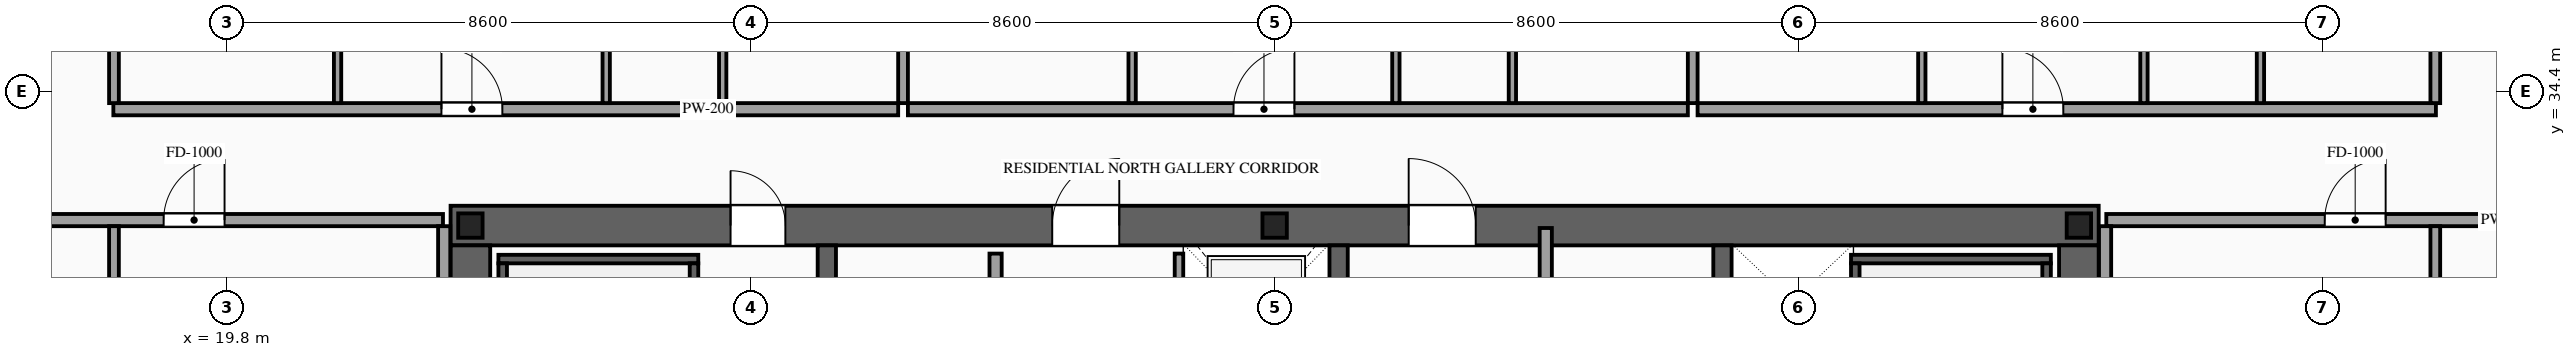
"""IFC4 building model, lengths in metres.
Left out: names, types, materials, properties, quantities, classifications, styles, units other than length and angle.
Written with IfcOpenShell. Run it as: python <this file> out.ifc"""

import sys

from ifc_helpers import new_model, si_unit, direction, frame, frame_2d, origin, origin_2d, place, context, subcontext, project, spatial, rectangle, i_section, extrude, source, transform, mapped, element, fill, save


model = new_model("IFC4")
c1 = context("Model", 3, precision=1e-05, world=origin(), true_north=direction((0.0, 1.0)))
c2 = subcontext(c1, "Body", "Model", "MODEL_VIEW")
j1 = project(units=[si_unit("LENGTHUNIT", "METRE"), si_unit("PLANEANGLEUNIT", "RADIAN")], contexts=[c1])
p1 = place(None, origin())
s1 = spatial("IfcSite", under=j1, at=p1, CompositionType="ELEMENT")
p2 = place(p1, origin())
s2 = spatial("IfcBuilding", under=s1, at=p2, CompositionType="ELEMENT")
p3 = place(p2, frame((0.0, 0.0, 202.0)))
s3 = spatial("IfcBuildingStorey", under=s2, at=p3, CompositionType="ELEMENT", Elevation=202.0)
p4 = place(p3, frame((23.475, 32.2, 0.0), z_axis=(0.0, 0.0, 1.0), x_axis=(1.0, 0.0, 0.0)))
e1 = element("IfcWall", 1, at=p4, inside=s3, PredefinedType="SHEAR", context=c2, shape_type="SweptSolid", body=[
    extrude(rectangle(XDim=27.05, YDim=0.65, at=frame_2d((13.525, 0.0))), origin(), (0.0, 0.0, 1.0), 3.5),
])
p5 = place(p4, frame((4.595, 0.0, 0.0)))
e2 = element("IfcOpeningElement", 2, at=p5, cuts=e1, PredefinedType="OPENING", context=c2, shape_type="SweptSolid", body=[
    extrude(rectangle(XDim=0.9, YDim=2.15, at=frame_2d((0.45, 1.075))), frame((0.0, 0.34, 0.0), z_axis=(0.0, -1.0, 0.0), x_axis=(1.0, 0.0, 0.0)), (0.0, 0.0, 1.0), 0.68),
])
p6 = place(p4, frame((9.875, 0.0, 0.0)))
e3 = element("IfcOpeningElement", 3, at=p6, cuts=e1, PredefinedType="OPENING", context=c2, shape_type="SweptSolid", body=[
    extrude(rectangle(XDim=1.1, YDim=2.2, at=frame_2d((0.55, 1.1))), frame((0.0, 0.34, 0.0), z_axis=(0.0, -1.0, 0.0), x_axis=(1.0, 0.0, 0.0)), (0.0, 0.0, 1.0), 0.68),
])
p7 = place(p4, frame((15.725, 0.0, 0.0)))
e4 = element("IfcOpeningElement", 4, at=p7, cuts=e1, PredefinedType="OPENING", context=c2, shape_type="SweptSolid", body=[
    extrude(rectangle(XDim=1.1, YDim=2.2, at=frame_2d((0.55, 1.1))), frame((0.0, 0.34, 0.0), z_axis=(0.0, -1.0, 0.0), x_axis=(1.0, 0.0, 0.0)), (0.0, 0.0, 1.0), 0.68),
])
m1 = source(origin(), c2, "Body", "SweptSolid", [
    extrude(rectangle(XDim=12.15, YDim=0.65, at=frame_2d((6.075, 0.0))), origin(), (0.0, 0.0, 1.0), 3.5),
])
for number, where, z_axis, x_axis in (
    (5, (23.8, 19.725, 0.0), (0.0, 0.0, 1.0), (0.0, 1.0, 0.0)),
    (6, (50.2, 19.725, 0.0), (0.0, 0.0, 1.0), (0.0, 1.0, 0.0)),
):
    element("IfcWall", number, at=place(p3, frame(where, z_axis=z_axis, x_axis=x_axis)), inside=s3, PredefinedType="SHEAR", context=c2, shape_type="MappedRepresentation", body=[
        mapped(m1, transform((0.0, 0.0, 0.0), scale=1.0)),
    ])
m2 = source(origin(), c2, "Body", "SweptSolid", [
    extrude(rectangle(XDim=12.15, YDim=0.3, at=frame_2d((6.075, 0.0))), origin(), (0.0, 0.0, 1.0), 3.5),
])
for number, where, z_axis, x_axis in (
    (7, (29.65, 19.725, 0.0), (0.0, 0.0, 1.0), (0.0, 1.0, 0.0)),
    (8, (38.05, 19.725, 0.0), (0.0, 0.0, 1.0), (0.0, 1.0, 0.0)),
    (9, (44.35, 19.725, 0.0), (0.0, 0.0, 1.0), (0.0, 1.0, 0.0)),
):
    element("IfcWall", number, at=place(p3, frame(where, z_axis=z_axis, x_axis=x_axis)), inside=s3, PredefinedType="SOLIDWALL", context=c2, shape_type="MappedRepresentation", body=[
        mapped(m2, transform((0.0, 0.0, 0.0), scale=1.0)),
    ])
m3 = source(origin(), c2, "Body", "SweptSolid", [
    extrude(i_section(OverallWidth=0.4, OverallDepth=0.4, WebThickness=0.013, FlangeThickness=0.021, at=origin_2d()), origin(), (0.0, 0.0, 1.0), 3.5),
])
for number, where, z_axis, x_axis in (
    (10, (23.8, 32.2, 0.0), (0.0, 0.0, 1.0), (1.0, 0.0, 0.0)),
    (11, (37.0, 32.2, 0.0), (0.0, 0.0, 1.0), (1.0, 0.0, 0.0)),
    (12, (50.2, 32.2, 0.0), (0.0, 0.0, 1.0), (1.0, 0.0, 0.0)),
):
    element("IfcColumn", number, at=place(p3, frame(where, z_axis=z_axis, x_axis=x_axis)), inside=s3, PredefinedType="COLUMN", context=c2, shape_type="MappedRepresentation", body=[
        mapped(m3, transform((0.0, 0.0, 0.0), scale=1.0)),
    ])
p8 = place(p3, frame((35.43, 29.4, 0.0), z_axis=(0.0, 0.0, 1.0), x_axis=(0.0, 1.0, 0.0)))
e13 = element("IfcWall", 13, at=p8, inside=s3, PredefinedType="SOLIDWALL", context=c2, shape_type="SweptSolid", body=[
    extrude(rectangle(XDim=2.34, YDim=0.14, at=frame_2d((1.17, 0.0))), origin(), (0.0, 0.0, 1.0), 3.28),
])
p9 = place(p8, frame((0.62, 0.0, 0.0)))
e14 = element("IfcOpeningElement", 14, at=p9, cuts=e13, PredefinedType="OPENING", context=c2, shape_type="SweptSolid", body=[
    extrude(rectangle(XDim=1.1, YDim=2.2, at=frame_2d((0.55, 1.1))), frame((0.0, 0.085, 0.0), z_axis=(0.0, -1.0, 0.0), x_axis=(1.0, 0.0, 0.0)), (0.0, 0.0, 1.0), 0.17),
])
m4 = source(origin(), c2, "Body", "SweptSolid", [
    extrude(rectangle(XDim=3.28, YDim=0.14, at=frame_2d((1.64, 0.0))), origin(), (0.0, 0.0, 1.0), 3.28),
])
p10 = place(p3, frame((24.26, 31.65, 0.0), z_axis=(0.0, 0.0, 1.0), x_axis=(1.0, 0.0, 0.0)))
e15 = element("IfcWall", 15, at=p10, inside=s3, PredefinedType="SOLIDWALL", context=c2, shape_type="MappedRepresentation", body=[
    mapped(m4, transform((0.0, 0.0, 0.0), scale=1.0)),
])
m5 = source(origin(), c2, "Body", "SweptSolid", [
    extrude(rectangle(XDim=8.94, YDim=0.14, at=frame_2d((4.47, 0.0))), origin(), (0.0, 0.0, 1.0), 3.28),
])
for number, where, z_axis, x_axis in (
    (16, (24.33, 22.64, 0.0), (0.0, 0.0, 1.0), (0.0, 1.0, 0.0)),
    (17, (27.47, 22.64, 0.0), (0.0, 0.0, 1.0), (0.0, 1.0, 0.0)),
):
    element("IfcWall", number, at=place(p3, frame(where, z_axis=z_axis, x_axis=x_axis)), inside=s3, PredefinedType="SOLIDWALL", context=c2, shape_type="MappedRepresentation", body=[
        mapped(m5, transform((0.0, 0.0, 0.0), scale=1.0)),
    ])
p11 = place(p3, frame((46.46, 31.65, 0.0), z_axis=(0.0, 0.0, 1.0), x_axis=(1.0, 0.0, 0.0)))
e18 = element("IfcWall", 18, at=p11, inside=s3, PredefinedType="SOLIDWALL", context=c2, shape_type="MappedRepresentation", body=[
    mapped(m4, transform((0.0, 0.0, 0.0), scale=1.0)),
])
for number, where, z_axis, x_axis in (
    (19, (46.53, 22.64, 0.0), (0.0, 0.0, 1.0), (0.0, 1.0, 0.0)),
    (20, (49.67, 22.64, 0.0), (0.0, 0.0, 1.0), (0.0, 1.0, 0.0)),
):
    element("IfcWall", number, at=place(p3, frame(where, z_axis=z_axis, x_axis=x_axis)), inside=s3, PredefinedType="SOLIDWALL", context=c2, shape_type="MappedRepresentation", body=[
        mapped(m5, transform((0.0, 0.0, 0.0), scale=1.0)),
    ])
p12 = place(p3, frame((32.42, 19.86, 0.0), z_axis=(0.0, 0.0, 1.0), x_axis=(0.0, 1.0, 0.0)))
e21 = element("IfcWall", 21, at=p12, inside=s3, PredefinedType="PARTITIONING", context=c2, shape_type="SweptSolid", body=[
    extrude(rectangle(XDim=11.88, YDim=0.2, at=frame_2d((5.94, 0.0))), origin(), (0.0, 0.0, 1.0), 3.28),
])
p13 = place(p12, frame((5.49, 0.0, 0.0)))
e22 = element("IfcOpeningElement", 22, at=p13, cuts=e21, PredefinedType="OPENING", context=c2, shape_type="SweptSolid", body=[
    extrude(rectangle(XDim=0.9, YDim=2.15, at=frame_2d((0.45, 1.075))), frame((0.0, 0.115, 0.0), z_axis=(0.0, -1.0, 0.0), x_axis=(1.0, 0.0, 0.0)), (0.0, 0.0, 1.0), 0.23),
])
m6 = source(origin(), c2, "Body", "SweptSolid", [
    extrude(rectangle(XDim=12.72, YDim=0.2, at=frame_2d((6.36, 0.0))), origin(), (0.0, 0.0, 1.0), 3.28),
])
p14 = place(p3, frame((41.45, 19.44, 0.0), z_axis=(0.0, 0.0, 1.0), x_axis=(0.0, 1.0, 0.0)))
e23 = element("IfcWall", 23, at=p14, inside=s3, PredefinedType="PARTITIONING", context=c2, shape_type="MappedRepresentation", body=[
    mapped(m6, transform((0.0, 0.0, 0.0), scale=1.0)),
])
p15 = place(p3, frame((17.94, 34.11, 0.0), z_axis=(0.0, 0.0, 1.0), x_axis=(1.0, 0.0, 0.0)))
e24 = element("IfcWall", 24, at=p15, inside=s3, PredefinedType="PARTITIONING", context=c2, shape_type="SweptSolid", body=[
    extrude(rectangle(XDim=12.881, YDim=0.2, at=frame_2d((6.44, 0.0))), origin(), (0.0, 0.0, 1.0), 3.28),
])
p16 = place(p15, frame((5.385, 0.0, 0.0)))
e25 = element("IfcOpeningElement", 25, at=p16, cuts=e24, PredefinedType="OPENING", context=c2, shape_type="SweptSolid", body=[
    extrude(rectangle(XDim=1.0, YDim=2.2, at=frame_2d((0.5, 1.1))), frame((0.0, 0.115, 0.0), z_axis=(0.0, -1.0, 0.0), x_axis=(1.0, 0.0, 0.0)), (0.0, 0.0, 1.0), 0.23),
])
m7 = source(origin(), c2, "Body", "SweptSolid", [
    extrude(rectangle(XDim=13.54, YDim=0.16, at=frame_2d((6.77, 0.0))), origin(), (0.0, 0.0, 1.0), 3.28),
])
p17 = place(p3, frame((30.901, 34.21, 0.0), z_axis=(0.0, 0.0, 1.0), x_axis=(0.0, 1.0, 0.0)))
e26 = element("IfcWall", 26, at=p17, inside=s3, PredefinedType="PARTITIONING", context=c2, shape_type="MappedRepresentation", body=[
    mapped(m7, transform((0.0, 0.0, 0.0), scale=1.0)),
])
m8 = source(origin(), c2, "Body", "SweptSolid", [
    extrude(rectangle(XDim=5.61, YDim=0.12, at=frame_2d((2.805, 0.0))), origin(), (0.0, 0.0, 1.0), 3.28),
])
p18 = place(p3, frame((21.62, 34.21, 0.0), z_axis=(0.0, 0.0, 1.0), x_axis=(0.0, 1.0, 0.0)))
e27 = element("IfcWall", 27, at=p18, inside=s3, PredefinedType="PARTITIONING", context=c2, shape_type="MappedRepresentation", body=[
    mapped(m8, transform((0.0, 0.0, 0.0), scale=1.0)),
])
p19 = place(p3, frame((27.941, 34.21, 0.0), z_axis=(0.0, 0.0, 1.0), x_axis=(0.0, 1.0, 0.0)))
e28 = element("IfcWall", 28, at=p19, inside=s3, PredefinedType="PARTITIONING", context=c2, shape_type="SweptSolid", body=[
    extrude(rectangle(XDim=5.61, YDim=0.12, at=frame_2d((2.805, 0.0))), origin(), (0.0, 0.0, 1.0), 3.28),
])
p20 = place(p19, frame((2.38, 0.0, 0.0)))
e29 = element("IfcOpeningElement", 29, at=p20, cuts=e28, PredefinedType="OPENING", context=c2, shape_type="SweptSolid", body=[
    extrude(rectangle(XDim=0.85, YDim=2.1, at=frame_2d((0.425, 1.05))), frame((0.0, 0.075, 0.0), z_axis=(0.0, -1.0, 0.0), x_axis=(1.0, 0.0, 0.0)), (0.0, 0.0, 1.0), 0.15),
])
p21 = place(p3, frame((26.029, 34.21, 0.0), z_axis=(0.0, 0.0, 1.0), x_axis=(0.0, 1.0, 0.0)))
e30 = element("IfcWall", 30, at=p21, inside=s3, PredefinedType="PARTITIONING", context=c2, shape_type="SweptSolid", body=[
    extrude(rectangle(XDim=5.61, YDim=0.12, at=frame_2d((2.805, 0.0))), origin(), (0.0, 0.0, 1.0), 3.28),
])
p22 = place(p21, frame((2.38, 0.0, 0.0)))
e31 = element("IfcOpeningElement", 31, at=p22, cuts=e30, PredefinedType="OPENING", context=c2, shape_type="SweptSolid", body=[
    extrude(rectangle(XDim=0.85, YDim=2.1, at=frame_2d((0.425, 1.05))), frame((0.0, 0.075, 0.0), z_axis=(0.0, -1.0, 0.0), x_axis=(1.0, 0.0, 0.0)), (0.0, 0.0, 1.0), 0.15),
])
p23 = place(p3, frame((30.981, 34.11, 0.0), z_axis=(0.0, 0.0, 1.0), x_axis=(1.0, 0.0, 0.0)))
e32 = element("IfcWall", 32, at=p23, inside=s3, PredefinedType="PARTITIONING", context=c2, shape_type="SweptSolid", body=[
    extrude(rectangle(XDim=12.801, YDim=0.2, at=frame_2d((6.4, 0.0))), origin(), (0.0, 0.0, 1.0), 3.28),
])
p24 = place(p23, frame((5.344, 0.0, 0.0)))
e33 = element("IfcOpeningElement", 33, at=p24, cuts=e32, PredefinedType="OPENING", context=c2, shape_type="SweptSolid", body=[
    extrude(rectangle(XDim=1.0, YDim=2.2, at=frame_2d((0.5, 1.1))), frame((0.0, 0.115, 0.0), z_axis=(0.0, -1.0, 0.0), x_axis=(1.0, 0.0, 0.0)), (0.0, 0.0, 1.0), 0.23),
])
p25 = place(p3, frame((43.862, 34.21, 0.0), z_axis=(0.0, 0.0, 1.0), x_axis=(0.0, 1.0, 0.0)))
e34 = element("IfcWall", 34, at=p25, inside=s3, PredefinedType="PARTITIONING", context=c2, shape_type="MappedRepresentation", body=[
    mapped(m7, transform((0.0, 0.0, 0.0), scale=1.0)),
])
p26 = place(p3, frame((34.661, 34.21, 0.0), z_axis=(0.0, 0.0, 1.0), x_axis=(0.0, 1.0, 0.0)))
e35 = element("IfcWall", 35, at=p26, inside=s3, PredefinedType="PARTITIONING", context=c2, shape_type="MappedRepresentation", body=[
    mapped(m8, transform((0.0, 0.0, 0.0), scale=1.0)),
])
p27 = place(p3, frame((40.902, 34.21, 0.0), z_axis=(0.0, 0.0, 1.0), x_axis=(0.0, 1.0, 0.0)))
e36 = element("IfcWall", 36, at=p27, inside=s3, PredefinedType="PARTITIONING", context=c2, shape_type="SweptSolid", body=[
    extrude(rectangle(XDim=5.61, YDim=0.12, at=frame_2d((2.805, 0.0))), origin(), (0.0, 0.0, 1.0), 3.28),
])
p28 = place(p27, frame((2.38, 0.0, 0.0)))
e37 = element("IfcOpeningElement", 37, at=p28, cuts=e36, PredefinedType="OPENING", context=c2, shape_type="SweptSolid", body=[
    extrude(rectangle(XDim=0.85, YDim=2.1, at=frame_2d((0.425, 1.05))), frame((0.0, 0.075, 0.0), z_axis=(0.0, -1.0, 0.0), x_axis=(1.0, 0.0, 0.0)), (0.0, 0.0, 1.0), 0.15),
])
p29 = place(p3, frame((38.99, 34.21, 0.0), z_axis=(0.0, 0.0, 1.0), x_axis=(0.0, 1.0, 0.0)))
e38 = element("IfcWall", 38, at=p29, inside=s3, PredefinedType="PARTITIONING", context=c2, shape_type="SweptSolid", body=[
    extrude(rectangle(XDim=5.61, YDim=0.12, at=frame_2d((2.805, 0.0))), origin(), (0.0, 0.0, 1.0), 3.28),
])
p30 = place(p29, frame((2.38, 0.0, 0.0)))
e39 = element("IfcOpeningElement", 39, at=p30, cuts=e38, PredefinedType="OPENING", context=c2, shape_type="SweptSolid", body=[
    extrude(rectangle(XDim=0.85, YDim=2.1, at=frame_2d((0.425, 1.05))), frame((0.0, 0.075, 0.0), z_axis=(0.0, -1.0, 0.0), x_axis=(1.0, 0.0, 0.0)), (0.0, 0.0, 1.0), 0.15),
])
p31 = place(p3, frame((43.942, 34.11, 0.0), z_axis=(0.0, 0.0, 1.0), x_axis=(1.0, 0.0, 0.0)))
e40 = element("IfcWall", 40, at=p31, inside=s3, PredefinedType="PARTITIONING", context=c2, shape_type="SweptSolid", body=[
    extrude(rectangle(XDim=12.118, YDim=0.2, at=frame_2d((6.059, 0.0))), origin(), (0.0, 0.0, 1.0), 3.28),
])
p32 = place(p31, frame((5.003, 0.0, 0.0)))
e41 = element("IfcOpeningElement", 41, at=p32, cuts=e40, PredefinedType="OPENING", context=c2, shape_type="SweptSolid", body=[
    extrude(rectangle(XDim=1.0, YDim=2.2, at=frame_2d((0.5, 1.1))), frame((0.0, 0.115, 0.0), z_axis=(0.0, -1.0, 0.0), x_axis=(1.0, 0.0, 0.0)), (0.0, 0.0, 1.0), 0.23),
])
m9 = source(origin(), c2, "Body", "SweptSolid", [
    extrude(rectangle(XDim=13.39, YDim=0.16, at=frame_2d((6.695, 0.0))), origin(), (0.0, 0.0, 1.0), 3.28),
])
for number, where, z_axis, x_axis in (
    (42, (17.95, 34.21, 0.0), (0.0, 0.0, 1.0), (0.0, 1.0, 0.0)),
    (43, (56.05, 34.21, 0.0), (0.0, 0.0, 1.0), (0.0, 1.0, 0.0)),
):
    element("IfcWall", number, at=place(p3, frame(where, z_axis=z_axis, x_axis=x_axis)), inside=s3, PredefinedType="PARTITIONING", context=c2, shape_type="MappedRepresentation", body=[
        mapped(m9, transform((0.0, 0.0, 0.0), scale=1.0)),
    ])
p33 = place(p3, frame((47.622, 34.21, 0.0), z_axis=(0.0, 0.0, 1.0), x_axis=(0.0, 1.0, 0.0)))
e44 = element("IfcWall", 44, at=p33, inside=s3, PredefinedType="PARTITIONING", context=c2, shape_type="MappedRepresentation", body=[
    mapped(m8, transform((0.0, 0.0, 0.0), scale=1.0)),
])
p34 = place(p3, frame((53.18, 34.21, 0.0), z_axis=(0.0, 0.0, 1.0), x_axis=(0.0, 1.0, 0.0)))
e45 = element("IfcWall", 45, at=p34, inside=s3, PredefinedType="PARTITIONING", context=c2, shape_type="SweptSolid", body=[
    extrude(rectangle(XDim=5.61, YDim=0.12, at=frame_2d((2.805, 0.0))), origin(), (0.0, 0.0, 1.0), 3.28),
])
p35 = place(p34, frame((2.38, 0.0, 0.0)))
e46 = element("IfcOpeningElement", 46, at=p35, cuts=e45, PredefinedType="OPENING", context=c2, shape_type="SweptSolid", body=[
    extrude(rectangle(XDim=0.85, YDim=2.1, at=frame_2d((0.425, 1.05))), frame((0.0, 0.075, 0.0), z_axis=(0.0, -1.0, 0.0), x_axis=(1.0, 0.0, 0.0)), (0.0, 0.0, 1.0), 0.15),
])
p36 = place(p3, frame((51.268, 34.21, 0.0), z_axis=(0.0, 0.0, 1.0), x_axis=(0.0, 1.0, 0.0)))
e47 = element("IfcWall", 47, at=p36, inside=s3, PredefinedType="PARTITIONING", context=c2, shape_type="SweptSolid", body=[
    extrude(rectangle(XDim=5.61, YDim=0.12, at=frame_2d((2.805, 0.0))), origin(), (0.0, 0.0, 1.0), 3.28),
])
p37 = place(p36, frame((2.38, 0.0, 0.0)))
e48 = element("IfcOpeningElement", 48, at=p37, cuts=e47, PredefinedType="OPENING", context=c2, shape_type="SweptSolid", body=[
    extrude(rectangle(XDim=0.85, YDim=2.1, at=frame_2d((0.425, 1.05))), frame((0.0, 0.075, 0.0), z_axis=(0.0, -1.0, 0.0), x_axis=(1.0, 0.0, 0.0)), (0.0, 0.0, 1.0), 0.15),
])
p38 = place(p3, frame((15.05, 32.29, 0.0), z_axis=(0.0, 0.0, 1.0), x_axis=(1.0, 0.0, 0.0)))
e49 = element("IfcWall", 49, at=p38, inside=s3, PredefinedType="PARTITIONING", context=c2, shape_type="SweptSolid", body=[
    extrude(rectangle(XDim=8.3, YDim=0.2, at=frame_2d((4.15, 0.0))), origin(), (0.0, 0.0, 1.0), 2.775),
])
p39 = place(p38, frame((3.715, 0.0, 0.0)))
e50 = element("IfcOpeningElement", 50, at=p39, cuts=e49, PredefinedType="OPENING", context=c2, shape_type="SweptSolid", body=[
    extrude(rectangle(XDim=1.0, YDim=2.2, at=frame_2d((0.5, 1.1))), frame((0.0, 0.115, 0.0), z_axis=(0.0, -1.0, 0.0), x_axis=(1.0, 0.0, 0.0)), (0.0, 0.0, 1.0), 0.23),
])
m10 = source(origin(), c2, "Body", "SweptSolid", [
    extrude(rectangle(XDim=12.78, YDim=0.2, at=frame_2d((6.39, 0.0))), origin(), (0.0, 0.0, 1.0), 3.28),
])
p40 = place(p3, frame((23.37, 19.41, 0.0), z_axis=(0.0, 0.0, 1.0), x_axis=(0.0, 1.0, 0.0)))
e51 = element("IfcWall", 51, at=p40, inside=s3, PredefinedType="PARTITIONING", context=c2, shape_type="MappedRepresentation", body=[
    mapped(m10, transform((0.0, 0.0, 0.0), scale=1.0)),
])
p41 = place(p3, frame((50.65, 32.29, 0.0), z_axis=(0.0, 0.0, 1.0), x_axis=(1.0, 0.0, 0.0)))
e52 = element("IfcWall", 52, at=p41, inside=s3, PredefinedType="PARTITIONING", context=c2, shape_type="SweptSolid", body=[
    extrude(rectangle(XDim=8.3, YDim=0.2, at=frame_2d((4.15, 0.0))), origin(), (0.0, 0.0, 1.0), 2.775),
])
p42 = place(p41, frame((3.585, 0.0, 0.0)))
e53 = element("IfcOpeningElement", 53, at=p42, cuts=e52, PredefinedType="OPENING", context=c2, shape_type="SweptSolid", body=[
    extrude(rectangle(XDim=1.0, YDim=2.2, at=frame_2d((0.5, 1.1))), frame((0.0, 0.115, 0.0), z_axis=(0.0, -1.0, 0.0), x_axis=(1.0, 0.0, 0.0)), (0.0, 0.0, 1.0), 0.23),
])
m11 = source(origin(), c2, "Body", "SweptSolid", [
    extrude(rectangle(XDim=28.19, YDim=0.16, at=frame_2d((14.095, 0.0))), origin(), (0.0, 0.0, 1.0), 3.28),
])
for number, where, z_axis, x_axis in (
    (54, (17.95, 4.0, 0.0), (0.0, 0.0, 1.0), (0.0, 1.0, 0.0)),
    (55, (56.05, 4.0, 0.0), (0.0, 0.0, 1.0), (0.0, 1.0, 0.0)),
):
    element("IfcWall", number, at=place(p3, frame(where, z_axis=z_axis, x_axis=x_axis)), inside=s3, PredefinedType="PARTITIONING", context=c2, shape_type="MappedRepresentation", body=[
        mapped(m11, transform((0.0, 0.0, 0.0), scale=1.0)),
    ])
m12 = source(origin(), c2, "Body", "SweptSolid", [
    extrude(rectangle(XDim=6.29, YDim=0.2, at=frame_2d((3.145, 0.0))), origin(), (0.0, 0.0, 1.0), 3.28),
])
p43 = place(p3, frame((50.63, 25.9, 0.0), z_axis=(0.0, 0.0, 1.0), x_axis=(0.0, 1.0, 0.0)))
e56 = element("IfcWall", 56, at=p43, inside=s3, PredefinedType="PARTITIONING", context=c2, shape_type="MappedRepresentation", body=[
    mapped(m12, transform((0.0, 0.0, 0.0), scale=1.0)),
])
m13 = source(origin(), c2, "Body", "SweptSolid", [
    extrude(rectangle(XDim=0.9, YDim=2.15, at=frame_2d((0.45, 1.075))), frame((0.0, 0.025, 0.0), z_axis=(0.0, -1.0, 0.0), x_axis=(1.0, 0.0, 0.0)), (0.0, 0.0, 1.0), 0.05),
])
p44 = place(p5, origin())
e57 = element("IfcDoor", 57, at=p44, inside=s3, OperationType="SINGLE_SWING_LEFT", PredefinedType="DOOR", context=c2, shape_type="MappedRepresentation", body=[
    mapped(m13, transform((0.0, 0.0, 0.0), scale=1.0)),
])
fill(e2, e57)
m14 = source(origin(), c2, "Body", "SweptSolid", [
    extrude(rectangle(XDim=1.1, YDim=2.2, at=frame_2d((0.55, 1.1))), frame((0.0, 0.025, 0.0), z_axis=(0.0, -1.0, 0.0), x_axis=(1.0, 0.0, 0.0)), (0.0, 0.0, 1.0), 0.05),
])
p45 = place(p6, origin())
e58 = element("IfcDoor", 58, at=p45, inside=s3, OperationType="SINGLE_SWING_RIGHT", PredefinedType="DOOR", context=c2, shape_type="MappedRepresentation", body=[
    mapped(m14, transform((0.0, 0.0, 0.0), scale=1.0)),
])
fill(e3, e58)
p46 = place(p7, origin())
e59 = element("IfcDoor", 59, at=p46, inside=s3, OperationType="SINGLE_SWING_LEFT", PredefinedType="DOOR", context=c2, shape_type="MappedRepresentation", body=[
    mapped(m14, transform((0.0, 0.0, 0.0), scale=1.0)),
])
fill(e4, e59)
m15 = source(origin(), c2, "Body", "SweptSolid", [
    extrude(rectangle(XDim=1.0, YDim=2.2, at=frame_2d((0.5, 1.1))), frame((0.0, 0.025, 0.0), z_axis=(0.0, -1.0, 0.0), x_axis=(1.0, 0.0, 0.0)), (0.0, 0.0, 1.0), 0.05),
])
p47 = place(p16, origin())
e60 = element("IfcDoor", 60, at=p47, inside=s3, OperationType="SINGLE_SWING_LEFT", PredefinedType="DOOR", context=c2, shape_type="MappedRepresentation", body=[
    mapped(m15, transform((0.0, 0.0, 0.0), scale=1.0)),
])
fill(e25, e60)
p48 = place(p24, origin())
e61 = element("IfcDoor", 61, at=p48, inside=s3, OperationType="SINGLE_SWING_RIGHT", PredefinedType="DOOR", context=c2, shape_type="MappedRepresentation", body=[
    mapped(m15, transform((0.0, 0.0, 0.0), scale=1.0)),
])
fill(e33, e61)
p49 = place(p32, origin())
e62 = element("IfcDoor", 62, at=p49, inside=s3, OperationType="SINGLE_SWING_LEFT", PredefinedType="DOOR", context=c2, shape_type="MappedRepresentation", body=[
    mapped(m15, transform((0.0, 0.0, 0.0), scale=1.0)),
])
fill(e41, e62)
p50 = place(p39, origin())
e63 = element("IfcDoor", 63, at=p50, inside=s3, OperationType="SINGLE_SWING_RIGHT", PredefinedType="DOOR", context=c2, shape_type="MappedRepresentation", body=[
    mapped(m15, transform((0.0, 0.0, 0.0), scale=1.0)),
])
fill(e50, e63)
p51 = place(p42, origin())
e64 = element("IfcDoor", 64, at=p51, inside=s3, OperationType="SINGLE_SWING_RIGHT", PredefinedType="DOOR", context=c2, shape_type="MappedRepresentation", body=[
    mapped(m15, transform((0.0, 0.0, 0.0), scale=1.0)),
])
fill(e53, e64)
save(model, sys.argv[1])
